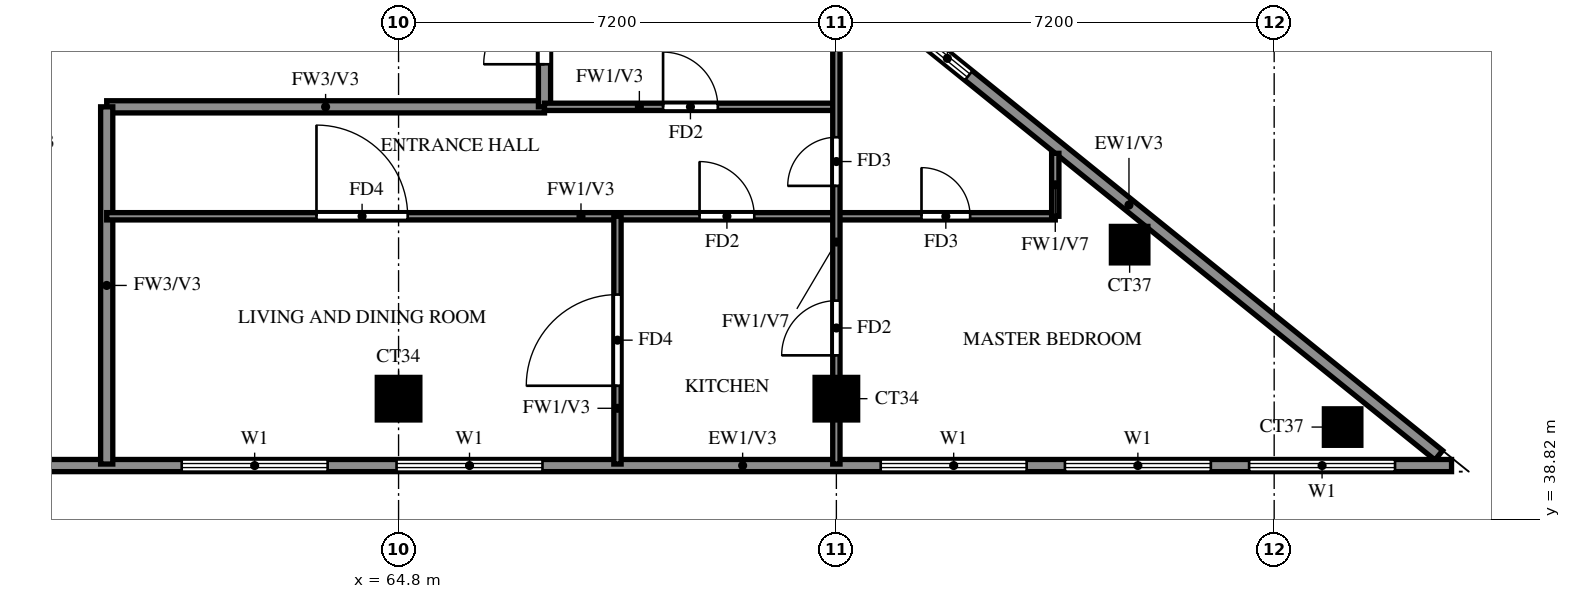
"""IFC4 building model, lengths in metres.
Left out: names, types, materials, properties, quantities, classifications, styles, units other than length and angle.
Written with IfcOpenShell. Run it as: python <this file> out.ifc"""

import sys

from ifc_helpers import new_model, si_unit, direction, frame, frame_2d, origin, origin_2d, place, context, subcontext, project, spatial, rectangle, extrude, source, transform, mapped, element, fill, save


model = new_model("IFC4")
c1 = context("Model", 3, precision=1e-05, world=origin(), true_north=direction((0.0, 1.0)))
c2 = subcontext(c1, "Body", "Model", "MODEL_VIEW")
j1 = project(units=[si_unit("LENGTHUNIT", "METRE"), si_unit("PLANEANGLEUNIT", "RADIAN")], contexts=[c1])
p1 = place(None, origin())
s1 = spatial("IfcSite", under=j1, at=p1, CompositionType="ELEMENT")
p2 = place(p1, origin())
s2 = spatial("IfcBuilding", under=s1, at=p2, CompositionType="ELEMENT")
p3 = place(p2, frame((0.0, 0.0, 257.0)))
s3 = spatial("IfcBuildingStorey", under=s2, at=p3, CompositionType="ELEMENT", Elevation=257.0)
m1 = source(origin(), c2, "Body", "SweptSolid", [
    extrude(rectangle(XDim=0.6, YDim=0.6, at=origin_2d()), origin(), (0.0, 0.0, 1.0), 3.22),
])
p4 = place(p3, frame((80.326, 40.333, 0.0), z_axis=(0.0, 0.0, 1.0), x_axis=(1.0, 0.0, 0.0)))
e1 = element("IfcColumn", 1, at=p4, inside=s3, PredefinedType="COLUMN", context=c2, shape_type="MappedRepresentation", body=[
    mapped(m1, transform((0.0, 0.0, 0.0))),
])
m2 = source(origin(), c2, "Body", "SweptSolid", [
    extrude(rectangle(XDim=0.7, YDim=0.7, at=origin_2d()), origin(), (0.0, 0.0, 1.0), 3.22),
])
for number, where, z_axis, x_axis in (
    (2, (64.8, 40.8, 0.0), (0.0, 0.0, 1.0), (1.0, 0.0, 0.0)),
    (3, (72.0, 40.8, 0.0), (0.0, 0.0, 1.0), (1.0, 0.0, 0.0)),
):
    element("IfcColumn", number, at=place(p3, frame(where, z_axis=z_axis, x_axis=x_axis)), inside=s3, PredefinedType="COLUMN", context=c2, shape_type="MappedRepresentation", body=[
        mapped(m2, transform((0.0, 0.0, 0.0))),
    ])
p5 = place(p3, frame((76.823, 43.333, 0.0), z_axis=(0.0, 0.0, 1.0), x_axis=(1.0, 0.0, 0.0)))
e4 = element("IfcColumn", 4, at=p5, inside=s3, PredefinedType="COLUMN", context=c2, shape_type="MappedRepresentation", body=[
    mapped(m1, transform((0.0, 0.0, 0.0))),
])
p6 = place(p3, frame((81.907, 39.87, 0.0), z_axis=(0.0, 0.0, 1.0), x_axis=(-0.777936274417, 0.62834318087, 0.0)))
e5 = element("IfcWall", 5, at=p6, inside=s3, PredefinedType="SOLIDWALL", context=c2, shape_type="SweptSolid", body=[
    extrude(rectangle(XDim=13.099, YDim=0.2, at=frame_2d((6.549, 0.0))), origin(), (0.0, 0.0, 1.0), 3.22),
])
p7 = place(p6, frame((9.938, 0.0, 1.5)))
e6 = element("IfcOpeningElement", 6, at=p7, cuts=e5, PredefinedType="OPENING", context=c2, shape_type="SweptSolid", body=[
    extrude(rectangle(XDim=0.9, YDim=0.9, at=frame_2d((0.45, 0.45))), frame((0.0, 0.11, 0.0), z_axis=(0.0, -1.0, 0.0), x_axis=(1.0, 0.0, 0.0)), (0.0, 0.0, 1.0), 0.22),
])
p8 = place(p3, frame((58.8, 39.7, 0.0), z_axis=(0.0, 0.0, 1.0), x_axis=(1.0, 0.0, 0.0)))
e7 = element("IfcWall", 7, at=p8, inside=s3, PredefinedType="SOLIDWALL", context=c2, shape_type="SweptSolid", body=[
    extrude(rectangle(XDim=23.317, YDim=0.2, at=frame_2d((11.658, 0.0))), origin(), (0.0, 0.0, 1.0), 3.22),
])
p9 = place(p8, frame((2.433, 0.0, 0.6)))
e8 = element("IfcOpeningElement", 8, at=p9, cuts=e7, PredefinedType="OPENING", context=c2, shape_type="SweptSolid", body=[
    extrude(rectangle(XDim=2.4, YDim=2.4, at=frame_2d((1.2, 1.2))), frame((0.0, 0.11, 0.0), z_axis=(0.0, -1.0, 0.0), x_axis=(1.0, 0.0, 0.0)), (0.0, 0.0, 1.0), 0.22),
])
p10 = place(p8, frame((5.967, 0.0, 0.6)))
e9 = element("IfcOpeningElement", 9, at=p10, cuts=e7, PredefinedType="OPENING", context=c2, shape_type="SweptSolid", body=[
    extrude(rectangle(XDim=2.4, YDim=2.4, at=frame_2d((1.2, 1.2))), frame((0.0, 0.11, 0.0), z_axis=(0.0, -1.0, 0.0), x_axis=(1.0, 0.0, 0.0)), (0.0, 0.0, 1.0), 0.22),
])
p11 = place(p8, frame((13.929, 0.0, 0.6)))
e10 = element("IfcOpeningElement", 10, at=p11, cuts=e7, PredefinedType="OPENING", context=c2, shape_type="SweptSolid", body=[
    extrude(rectangle(XDim=2.4, YDim=2.4, at=frame_2d((1.2, 1.2))), frame((0.0, 0.11, 0.0), z_axis=(0.0, -1.0, 0.0), x_axis=(1.0, 0.0, 0.0)), (0.0, 0.0, 1.0), 0.22),
])
p12 = place(p8, frame((16.958, 0.0, 0.6)))
e11 = element("IfcOpeningElement", 11, at=p12, cuts=e7, PredefinedType="OPENING", context=c2, shape_type="SweptSolid", body=[
    extrude(rectangle(XDim=2.4, YDim=2.4, at=frame_2d((1.2, 1.2))), frame((0.0, 0.11, 0.0), z_axis=(0.0, -1.0, 0.0), x_axis=(1.0, 0.0, 0.0)), (0.0, 0.0, 1.0), 0.22),
])
p13 = place(p8, frame((19.988, 0.0, 0.6)))
e12 = element("IfcOpeningElement", 12, at=p13, cuts=e7, PredefinedType="OPENING", context=c2, shape_type="SweptSolid", body=[
    extrude(rectangle(XDim=2.4, YDim=2.4, at=frame_2d((1.2, 1.2))), frame((0.0, 0.11, 0.0), z_axis=(0.0, -1.0, 0.0), x_axis=(1.0, 0.0, 0.0)), (0.0, 0.0, 1.0), 0.22),
])
p14 = place(p3, frame((60.0, 45.6, 0.0), z_axis=(0.0, 0.0, 1.0), x_axis=(1.0, 0.0, 0.0)))
e13 = element("IfcWall", 13, at=p14, inside=s3, PredefinedType="SOLIDWALL", context=c2, shape_type="SweptSolid", body=[
    extrude(rectangle(XDim=7.2, YDim=0.2, at=frame_2d((3.6, 0.0))), origin(), (0.0, 0.0, 1.0), 3.22),
])
p15 = place(p3, frame((60.0, 39.725, 0.0), z_axis=(0.0, 0.0, 1.0), x_axis=(0.0, 1.0, 0.0)))
e14 = element("IfcWall", 14, at=p15, inside=s3, PredefinedType="SOLIDWALL", context=c2, shape_type="SweptSolid", body=[
    extrude(rectangle(XDim=5.875, YDim=0.2, at=frame_2d((2.938, 0.0))), origin(), (0.0, 0.0, 1.0), 3.22),
])
p16 = place(p3, frame((67.2, 45.6, 0.0), z_axis=(0.0, 0.0, 1.0), x_axis=(0.0, 1.0, 0.0)))
e15 = element("IfcWall", 15, at=p16, inside=s3, PredefinedType="SOLIDWALL", context=c2, shape_type="SweptSolid", body=[
    extrude(rectangle(XDim=12.0, YDim=0.2, at=frame_2d((6.0, 0.0))), origin(), (0.0, 0.0, 1.0), 3.22),
])
p17 = place(p16, frame((10.3, 0.0, 0.0)))
e16 = element("IfcOpeningElement", 16, at=p17, cuts=e15, PredefinedType="OPENING", context=c2, shape_type="SweptSolid", body=[
    extrude(rectangle(XDim=1.0, YDim=2.1, at=frame_2d((0.5, 1.05))), frame((0.0, 0.11, 0.0), z_axis=(0.0, -1.0, 0.0), x_axis=(1.0, 0.0, 0.0)), (0.0, 0.0, 1.0), 0.22),
])
p18 = place(p16, frame((0.7, 0.0, 0.0)))
e17 = element("IfcOpeningElement", 17, at=p18, cuts=e15, PredefinedType="OPENING", context=c2, shape_type="SweptSolid", body=[
    extrude(rectangle(XDim=1.0, YDim=2.1, at=frame_2d((0.5, 1.05))), frame((0.0, 0.11, 0.0), z_axis=(0.0, -1.0, 0.0), x_axis=(1.0, 0.0, 0.0)), (0.0, 0.0, 1.0), 0.22),
])
p19 = place(p3, frame((60.0, 43.8, 0.0), z_axis=(0.0, 0.0, 1.0), x_axis=(1.0, 0.0, 0.0)))
e18 = element("IfcWall", 18, at=p19, inside=s3, PredefinedType="PARTITIONING", context=c2, shape_type="SweptSolid", body=[
    extrude(rectangle(XDim=15.6, YDim=0.12, at=frame_2d((7.8, 0.0))), origin(), (0.0, 0.0, 1.0), 3.22),
])
p20 = place(p19, frame((9.75, 0.0, 0.0)))
e19 = element("IfcOpeningElement", 19, at=p20, cuts=e18, PredefinedType="OPENING", context=c2, shape_type="SweptSolid", body=[
    extrude(rectangle(XDim=0.9, YDim=2.1, at=frame_2d((0.45, 1.05))), frame((0.0, 0.07, 0.0), z_axis=(0.0, -1.0, 0.0), x_axis=(1.0, 0.0, 0.0)), (0.0, 0.0, 1.0), 0.14),
])
p21 = place(p19, frame((3.45, 0.0, 0.0)))
e20 = element("IfcOpeningElement", 20, at=p21, cuts=e18, PredefinedType="OPENING", context=c2, shape_type="SweptSolid", body=[
    extrude(rectangle(XDim=1.5, YDim=2.1, at=frame_2d((0.75, 1.05))), frame((0.0, 0.07, 0.0), z_axis=(0.0, -1.0, 0.0), x_axis=(1.0, 0.0, 0.0)), (0.0, 0.0, 1.0), 0.14),
])
p22 = place(p19, frame((13.4, 0.0, 0.0)))
e21 = element("IfcOpeningElement", 21, at=p22, cuts=e18, PredefinedType="OPENING", context=c2, shape_type="SweptSolid", body=[
    extrude(rectangle(XDim=0.8, YDim=2.1, at=frame_2d((0.4, 1.05))), frame((0.0, 0.07, 0.0), z_axis=(0.0, -1.0, 0.0), x_axis=(1.0, 0.0, 0.0)), (0.0, 0.0, 1.0), 0.14),
])
p23 = place(p3, frame((67.2, 45.6, 0.0), z_axis=(0.0, 0.0, 1.0), x_axis=(1.0, 0.0, 0.0)))
e22 = element("IfcWall", 22, at=p23, inside=s3, PredefinedType="PARTITIONING", context=c2, shape_type="SweptSolid", body=[
    extrude(rectangle(XDim=4.8, YDim=0.12, at=frame_2d((2.4, 0.0))), origin(), (0.0, 0.0, 1.0), 3.22),
])
p24 = place(p23, frame((1.95, 0.0, 0.0)))
e23 = element("IfcOpeningElement", 23, at=p24, cuts=e22, PredefinedType="OPENING", context=c2, shape_type="SweptSolid", body=[
    extrude(rectangle(XDim=0.9, YDim=2.1, at=frame_2d((0.45, 1.05))), frame((0.0, 0.07, 0.0), z_axis=(0.0, -1.0, 0.0), x_axis=(1.0, 0.0, 0.0)), (0.0, 0.0, 1.0), 0.14),
])
p25 = place(p3, frame((68.4, 39.725, 0.0), z_axis=(0.0, 0.0, 1.0), x_axis=(0.0, 1.0, 0.0)))
e24 = element("IfcWall", 24, at=p25, inside=s3, PredefinedType="PARTITIONING", context=c2, shape_type="SweptSolid", body=[
    extrude(rectangle(XDim=4.075, YDim=0.12, at=frame_2d((2.038, 0.0))), origin(), (0.0, 0.0, 1.0), 3.22),
])
p26 = place(p25, frame((1.288, 0.0, 0.0)))
e25 = element("IfcOpeningElement", 25, at=p26, cuts=e24, PredefinedType="OPENING", context=c2, shape_type="SweptSolid", body=[
    extrude(rectangle(XDim=1.5, YDim=2.1, at=frame_2d((0.75, 1.05))), frame((0.0, 0.07, 0.0), z_axis=(0.0, -1.0, 0.0), x_axis=(1.0, 0.0, 0.0)), (0.0, 0.0, 1.0), 0.14),
])
p27 = place(p3, frame((72.0, 39.725, 0.0), z_axis=(0.0, 0.0, 1.0), x_axis=(0.0, 1.0, 0.0)))
e26 = element("IfcWall", 26, at=p27, inside=s3, PredefinedType="PARTITIONING", context=c2, shape_type="SweptSolid", body=[
    extrude(rectangle(XDim=8.114, YDim=0.12, at=frame_2d((4.057, 0.0))), origin(), (0.0, 0.0, 1.0), 2.32),
])
p28 = place(p27, frame((1.788, 0.0, 0.0)))
e27 = element("IfcOpeningElement", 27, at=p28, cuts=e26, PredefinedType="OPENING", context=c2, shape_type="SweptSolid", body=[
    extrude(rectangle(XDim=0.9, YDim=2.1, at=frame_2d((0.45, 1.05))), frame((0.0, 0.07, 0.0), z_axis=(0.0, -1.0, 0.0), x_axis=(1.0, 0.0, 0.0)), (0.0, 0.0, 1.0), 0.14),
])
p29 = place(p27, frame((4.575, 0.0, 0.0)))
e28 = element("IfcOpeningElement", 28, at=p29, cuts=e26, PredefinedType="OPENING", context=c2, shape_type="SweptSolid", body=[
    extrude(rectangle(XDim=0.8, YDim=2.1, at=frame_2d((0.4, 1.05))), frame((0.0, 0.07, 0.0), z_axis=(0.0, -1.0, 0.0), x_axis=(1.0, 0.0, 0.0)), (0.0, 0.0, 1.0), 0.14),
])
p30 = place(p3, frame((75.6, 43.8, 0.0), z_axis=(0.0, 0.0, 1.0), x_axis=(0.0, 1.0, 0.0)))
e29 = element("IfcWall", 29, at=p30, inside=s3, PredefinedType="PARTITIONING", context=c2, shape_type="SweptSolid", body=[
    extrude(rectangle(XDim=1.035, YDim=0.12, at=frame_2d((0.518, 0.0))), origin(), (0.0, 0.0, 1.0), 2.32),
])
p31 = place(p7, origin())
e30 = element("IfcWindow", 30, at=p31, inside=s3, PartitioningType="SINGLE_PANEL", PredefinedType="WINDOW", context=c2, shape_type="SweptSolid", body=[
    extrude(rectangle(XDim=0.9, YDim=0.9, at=frame_2d((0.45, 0.45))), frame((0.0, 0.03, 0.0), z_axis=(0.0, -1.0, 0.0), x_axis=(1.0, 0.0, 0.0)), (0.0, 0.0, 1.0), 0.06),
])
fill(e6, e30)
p32 = place(p9, origin())
e31 = element("IfcWindow", 31, at=p32, inside=s3, PartitioningType="DOUBLE_PANEL_VERTICAL", PredefinedType="WINDOW", context=c2, shape_type="SweptSolid", body=[
    extrude(rectangle(XDim=2.4, YDim=2.4, at=frame_2d((1.2, 1.2))), frame((0.0, 0.03, 0.0), z_axis=(0.0, -1.0, 0.0), x_axis=(1.0, 0.0, 0.0)), (0.0, 0.0, 1.0), 0.06),
])
fill(e8, e31)
p33 = place(p10, origin())
e32 = element("IfcWindow", 32, at=p33, inside=s3, PartitioningType="DOUBLE_PANEL_VERTICAL", PredefinedType="WINDOW", context=c2, shape_type="SweptSolid", body=[
    extrude(rectangle(XDim=2.4, YDim=2.4, at=frame_2d((1.2, 1.2))), frame((0.0, 0.03, 0.0), z_axis=(0.0, -1.0, 0.0), x_axis=(1.0, 0.0, 0.0)), (0.0, 0.0, 1.0), 0.06),
])
fill(e9, e32)
p34 = place(p11, origin())
e33 = element("IfcWindow", 33, at=p34, inside=s3, PartitioningType="DOUBLE_PANEL_VERTICAL", PredefinedType="WINDOW", context=c2, shape_type="SweptSolid", body=[
    extrude(rectangle(XDim=2.4, YDim=2.4, at=frame_2d((1.2, 1.2))), frame((0.0, 0.03, 0.0), z_axis=(0.0, -1.0, 0.0), x_axis=(1.0, 0.0, 0.0)), (0.0, 0.0, 1.0), 0.06),
])
fill(e10, e33)
p35 = place(p12, origin())
e34 = element("IfcWindow", 34, at=p35, inside=s3, PartitioningType="DOUBLE_PANEL_VERTICAL", PredefinedType="WINDOW", context=c2, shape_type="SweptSolid", body=[
    extrude(rectangle(XDim=2.4, YDim=2.4, at=frame_2d((1.2, 1.2))), frame((0.0, 0.03, 0.0), z_axis=(0.0, -1.0, 0.0), x_axis=(1.0, 0.0, 0.0)), (0.0, 0.0, 1.0), 0.06),
])
fill(e11, e34)
p36 = place(p13, origin())
e35 = element("IfcWindow", 35, at=p36, inside=s3, PartitioningType="DOUBLE_PANEL_VERTICAL", PredefinedType="WINDOW", context=c2, shape_type="SweptSolid", body=[
    extrude(rectangle(XDim=2.4, YDim=2.4, at=frame_2d((1.2, 1.2))), frame((0.0, 0.03, 0.0), z_axis=(0.0, -1.0, 0.0), x_axis=(1.0, 0.0, 0.0)), (0.0, 0.0, 1.0), 0.06),
])
fill(e12, e35)
p37 = place(p26, origin())
e36 = element("IfcDoor", 36, at=p37, inside=s3, OperationType="SINGLE_SWING_RIGHT", PredefinedType="DOOR", context=c2, shape_type="SweptSolid", body=[
    extrude(rectangle(XDim=1.5, YDim=2.1, at=frame_2d((0.75, 1.05))), frame((0.0, 0.025, 0.0), z_axis=(0.0, -1.0, 0.0), x_axis=(1.0, 0.0, 0.0)), (0.0, 0.0, 1.0), 0.05),
])
fill(e25, e36)
p38 = place(p24, origin())
e37 = element("IfcDoor", 37, at=p38, inside=s3, OperationType="SINGLE_SWING_LEFT", PredefinedType="DOOR", context=c2, shape_type="SweptSolid", body=[
    extrude(rectangle(XDim=0.9, YDim=2.1, at=frame_2d((0.45, 1.05))), frame((0.0, 0.025, 0.0), z_axis=(0.0, -1.0, 0.0), x_axis=(1.0, 0.0, 0.0)), (0.0, 0.0, 1.0), 0.05),
])
fill(e23, e37)
p39 = place(p18, origin())
e38 = element("IfcDoor", 38, at=p39, inside=s3, OperationType="SINGLE_SWING_LEFT", PredefinedType="DOOR", context=c2, shape_type="SweptSolid", body=[
    extrude(rectangle(XDim=1.0, YDim=2.1, at=frame_2d((0.5, 1.05))), frame((0.0, 0.025, 0.0), z_axis=(0.0, -1.0, 0.0), x_axis=(1.0, 0.0, 0.0)), (0.0, 0.0, 1.0), 0.05),
])
fill(e17, e38)
p40 = place(p20, origin())
e39 = element("IfcDoor", 39, at=p40, inside=s3, OperationType="SINGLE_SWING_RIGHT", PredefinedType="DOOR", context=c2, shape_type="SweptSolid", body=[
    extrude(rectangle(XDim=0.9, YDim=2.1, at=frame_2d((0.45, 1.05))), frame((0.0, 0.025, 0.0), z_axis=(0.0, -1.0, 0.0), x_axis=(1.0, 0.0, 0.0)), (0.0, 0.0, 1.0), 0.05),
])
fill(e19, e39)
p41 = place(p21, origin())
e40 = element("IfcDoor", 40, at=p41, inside=s3, OperationType="SINGLE_SWING_LEFT", PredefinedType="DOOR", context=c2, shape_type="SweptSolid", body=[
    extrude(rectangle(XDim=1.5, YDim=2.1, at=frame_2d((0.75, 1.05))), frame((0.0, 0.025, 0.0), z_axis=(0.0, -1.0, 0.0), x_axis=(1.0, 0.0, 0.0)), (0.0, 0.0, 1.0), 0.05),
])
fill(e20, e40)
p42 = place(p28, origin())
e41 = element("IfcDoor", 41, at=p42, inside=s3, OperationType="SINGLE_SWING_RIGHT", PredefinedType="DOOR", context=c2, shape_type="SweptSolid", body=[
    extrude(rectangle(XDim=0.9, YDim=2.1, at=frame_2d((0.45, 1.05))), frame((0.0, 0.025, 0.0), z_axis=(0.0, -1.0, 0.0), x_axis=(1.0, 0.0, 0.0)), (0.0, 0.0, 1.0), 0.05),
])
fill(e27, e41)
p43 = place(p29, origin())
e42 = element("IfcDoor", 42, at=p43, inside=s3, OperationType="SINGLE_SWING_RIGHT", PredefinedType="DOOR", context=c2, shape_type="SweptSolid", body=[
    extrude(rectangle(XDim=0.8, YDim=2.1, at=frame_2d((0.4, 1.05))), frame((0.0, 0.025, 0.0), z_axis=(0.0, -1.0, 0.0), x_axis=(1.0, 0.0, 0.0)), (0.0, 0.0, 1.0), 0.05),
])
fill(e28, e42)
p44 = place(p22, origin())
e43 = element("IfcDoor", 43, at=p44, inside=s3, OperationType="SINGLE_SWING_LEFT", PredefinedType="DOOR", context=c2, shape_type="SweptSolid", body=[
    extrude(rectangle(XDim=0.8, YDim=2.1, at=frame_2d((0.4, 1.05))), frame((0.0, 0.025, 0.0), z_axis=(0.0, -1.0, 0.0), x_axis=(1.0, 0.0, 0.0)), (0.0, 0.0, 1.0), 0.05),
])
fill(e21, e43)
save(model, sys.argv[1])
